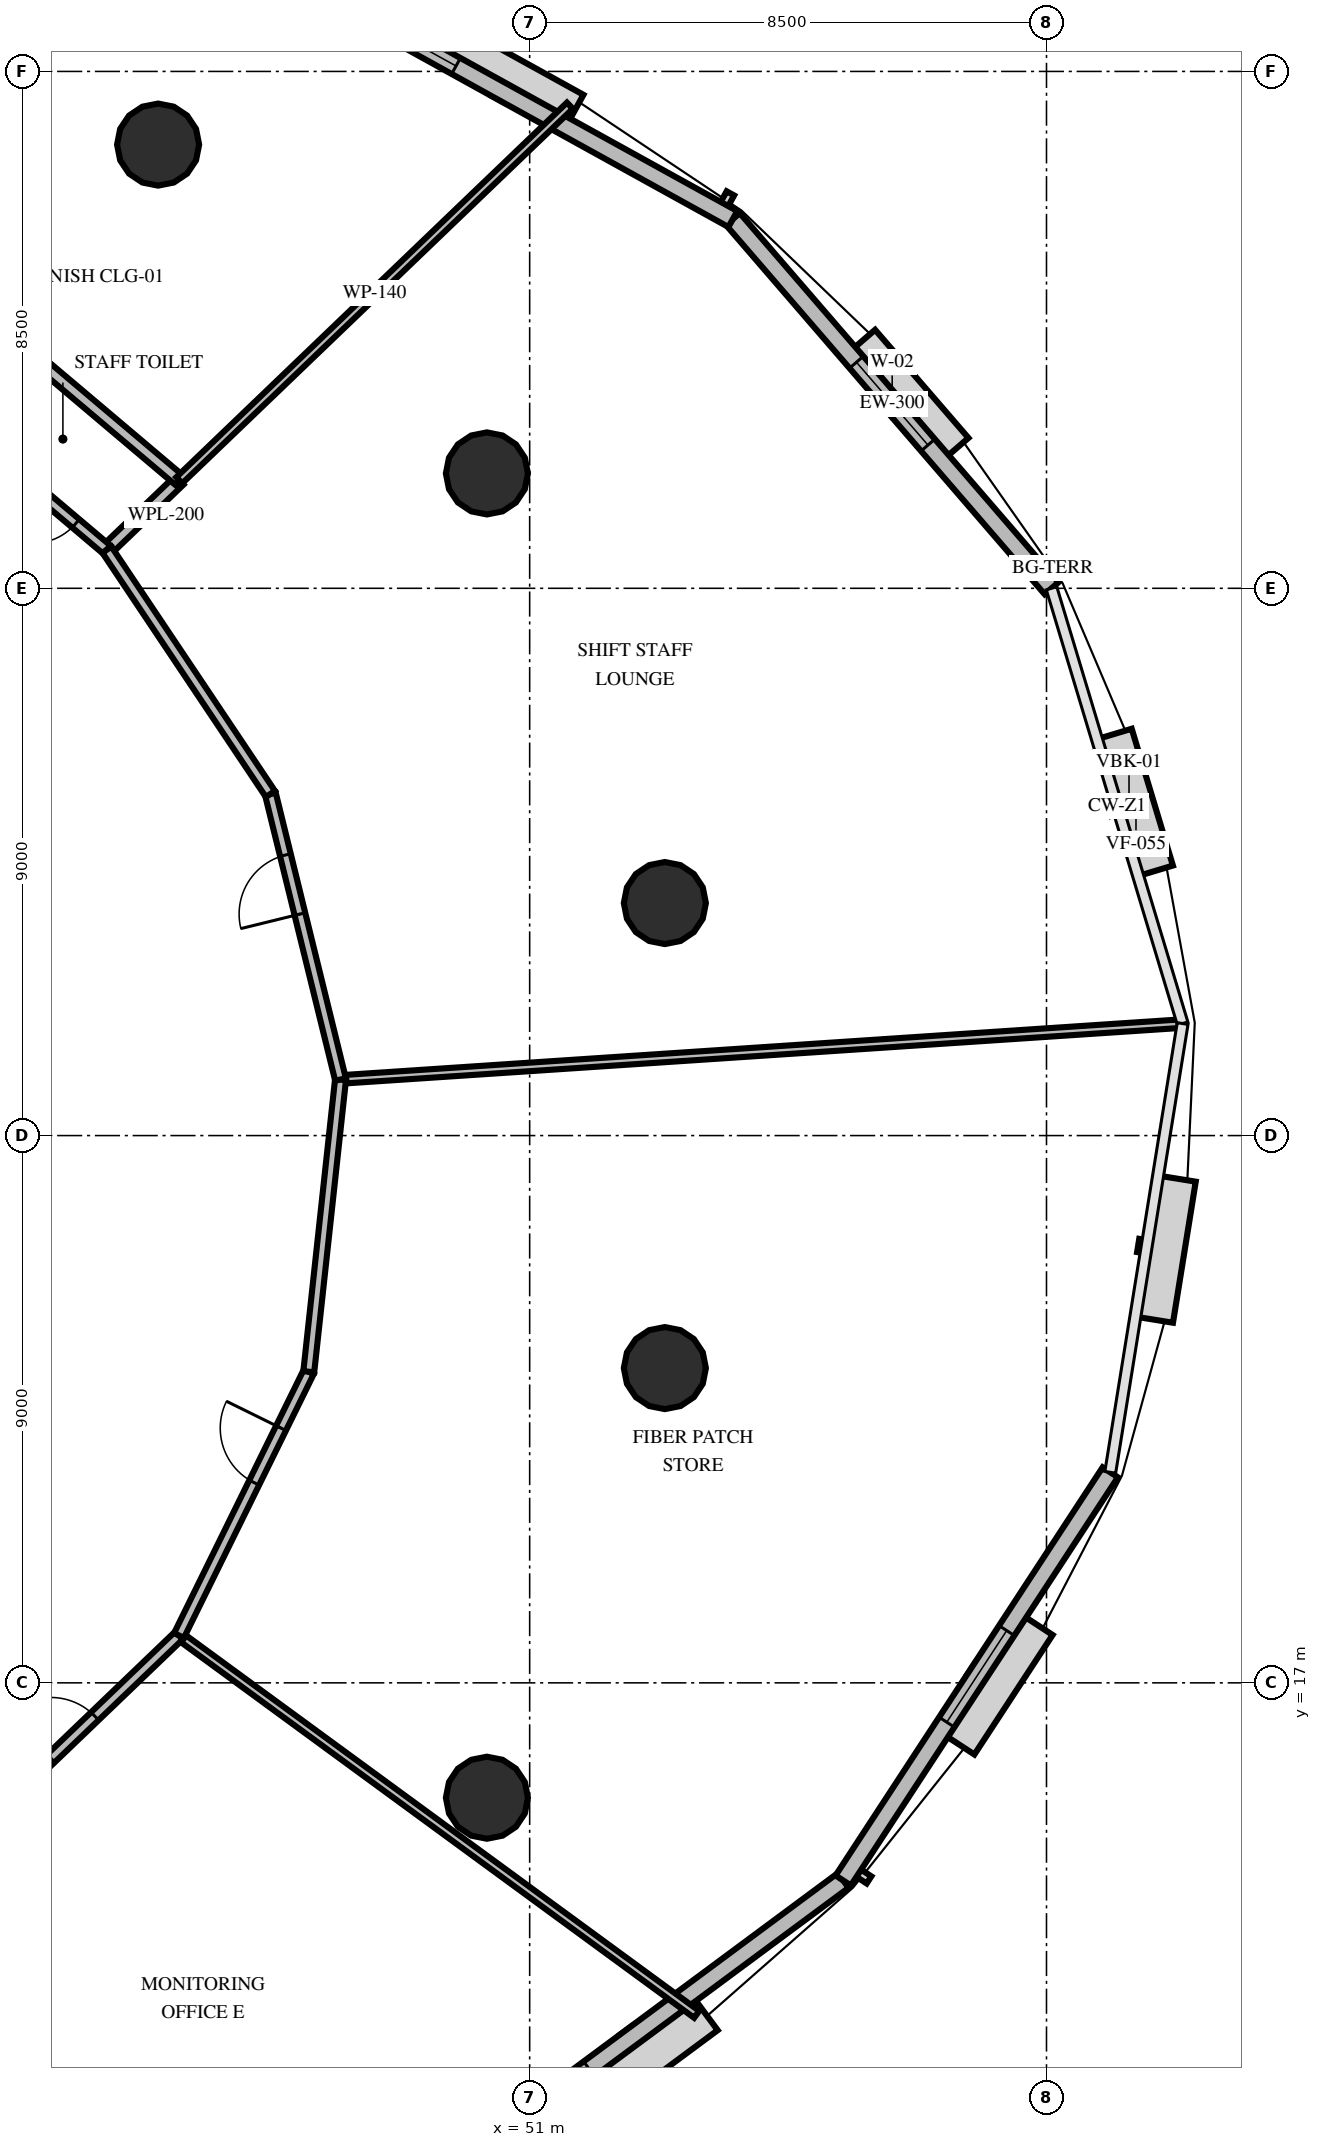
"""IFC4 building model, lengths in metres.
Left out: names, types, materials, properties, quantities, classifications, styles, units other than length and angle.
Written with IfcOpenShell. Run it as: python <this file> out.ifc"""

import sys

from ifc_helpers import new_model, si_unit, direction, frame, frame_2d, origin, origin_2d, place, context, subcontext, project, spatial, rectangle, circle, extrude, element, fill, save


model = new_model("IFC4")
c1 = context("Model", 3, precision=1e-05, world=origin(), true_north=direction((0.0, 1.0)))
c2 = subcontext(c1, "Body", "Model", "MODEL_VIEW")
j1 = project(units=[si_unit("LENGTHUNIT", "METRE"), si_unit("PLANEANGLEUNIT", "RADIAN")], contexts=[c1])
p1 = place(None, origin())
s1 = spatial("IfcSite", under=j1, at=p1, CompositionType="ELEMENT")
p2 = place(p1, origin())
s2 = spatial("IfcBuilding", under=s1, at=p2, CompositionType="ELEMENT")
p3 = place(p2, frame((0.0, 0.0, 46.8)))
s3 = spatial("IfcBuildingStorey", under=s2, at=p3, CompositionType="ELEMENT", Elevation=46.8)
for number, where, z_axis, x_axis in (
    (1, (53.223, 29.824, 0.0), (0.0, 0.0, 1.0), (1.0, 0.0, 0.0)),
    (2, (50.297, 36.889, 0.0), (0.0, 0.0, 1.0), (1.0, 0.0, 0.0)),
    (3, (44.889, 42.297, 0.0), (0.0, 0.0, 1.0), (1.0, 0.0, 0.0)),
    (4, (50.297, 15.111, 0.0), (0.0, 0.0, 1.0), (1.0, 0.0, 0.0)),
    (5, (53.223, 22.176, 0.0), (0.0, 0.0, 1.0), (1.0, 0.0, 0.0)),
):
    element("IfcColumn", number, at=place(p3, frame(where, z_axis=z_axis, x_axis=x_axis)), inside=s3, PredefinedType="COLUMN", context=c2, shape_type="SweptSolid", body=[
        extrude(circle(Radius=0.675, at=origin_2d()), origin(), (0.0, 0.0, 1.0), 4.2),
    ])
p4 = place(p3, frame((59.583, 35.0, 0.0), z_axis=(0.0, 0.0, 1.0), x_axis=(-0.653421746462, 0.756994069495, 0.0)))
e6 = element("IfcWall", 6, at=p4, inside=s3, PredefinedType="SOLIDWALL", context=c2, shape_type="SweptSolid", body=[
    extrude(rectangle(XDim=8.021, YDim=0.3, at=frame_2d((4.011, 0.0))), origin(), (0.0, 0.0, 1.0), 3.0),
])
p5 = place(p4, frame((3.111, 0.0, 0.8)))
e7 = element("IfcOpeningElement", 7, at=p5, cuts=e6, PredefinedType="OPENING", context=c2, shape_type="SweptSolid", body=[
    extrude(rectangle(XDim=1.8, YDim=1.95, at=frame_2d((0.9, 0.975))), frame((0.0, 0.16, 0.0), z_axis=(0.0, -1.0, 0.0), x_axis=(1.0, 0.0, 0.0)), (0.0, 0.0, 1.0), 0.32),
])
p6 = place(p3, frame((54.342, 41.073, 0.0), z_axis=(0.0, 0.0, 1.0), x_axis=(-0.875145624266, 0.48385962461, 0.0)))
e8 = element("IfcWall", 8, at=p6, inside=s3, PredefinedType="SOLIDWALL", context=c2, shape_type="SweptSolid", body=[
    extrude(rectangle(XDim=8.793, YDim=0.3, at=frame_2d((4.396, 0.0))), origin(), (0.0, 0.0, 1.0), 3.0),
])
p7 = place(p6, frame((5.202, 0.0, 0.8)))
e9 = element("IfcOpeningElement", 9, at=p7, cuts=e8, PredefinedType="OPENING", context=c2, shape_type="SweptSolid", body=[
    extrude(rectangle(XDim=1.8, YDim=1.95, at=frame_2d((0.9, 0.975))), frame((0.0, 0.16, 0.0), z_axis=(0.0, -1.0, 0.0), x_axis=(1.0, 0.0, 0.0)), (0.0, 0.0, 1.0), 0.32),
])
p8 = place(p3, frame((49.092, 8.515, 0.0), z_axis=(0.0, 0.0, 1.0), x_axis=(0.803465201032, 0.595351720187, 0.0)))
e10 = element("IfcWall", 10, at=p8, inside=s3, PredefinedType="SOLIDWALL", context=c2, shape_type="SweptSolid", body=[
    extrude(rectangle(XDim=8.792, YDim=0.3, at=frame_2d((4.396, 0.0))), origin(), (0.0, 0.0, 1.0), 3.0),
])
p9 = place(p8, frame((1.79, 0.0, 0.8)))
e11 = element("IfcOpeningElement", 11, at=p9, cuts=e10, PredefinedType="OPENING", context=c2, shape_type="SweptSolid", body=[
    extrude(rectangle(XDim=1.8, YDim=1.95, at=frame_2d((0.9, 0.975))), frame((0.0, 0.16, 0.0), z_axis=(0.0, -1.0, 0.0), x_axis=(1.0, 0.0, 0.0)), (0.0, 0.0, 1.0), 0.32),
])
p10 = place(p3, frame((56.156, 13.75, 0.0), z_axis=(0.0, 0.0, 1.0), x_axis=(0.547551088474, 0.836772254267, 0.0)))
e12 = element("IfcWall", 12, at=p10, inside=s3, PredefinedType="SOLIDWALL", context=c2, shape_type="SweptSolid", body=[
    extrude(rectangle(XDim=8.022, YDim=0.3, at=frame_2d((4.011, 0.0))), origin(), (0.0, 0.0, 1.0), 3.0),
])
p11 = place(p10, frame((3.111, 0.0, 0.8)))
e13 = element("IfcOpeningElement", 13, at=p11, cuts=e12, PredefinedType="OPENING", context=c2, shape_type="SweptSolid", body=[
    extrude(rectangle(XDim=1.8, YDim=1.95, at=frame_2d((0.9, 0.975))), frame((0.0, 0.16, 0.0), z_axis=(0.0, -1.0, 0.0), x_axis=(1.0, 0.0, 0.0)), (0.0, 0.0, 1.0), 0.32),
])
p12 = place(p3, frame((44.047, 35.635, 0.0), z_axis=(0.0, 0.0, 1.0), x_axis=(0.721747944502, 0.692155982858, 0.0)))
e14 = element("IfcWall", 14, at=p12, inside=s3, PredefinedType="PLUMBINGWALL", context=c2, shape_type="SweptSolid", body=[
    extrude(rectangle(XDim=1.65, YDim=0.2, at=frame_2d((0.825, 0.0))), origin(), (0.0, 0.0, 1.0), 3.0),
])
p13 = place(p3, frame((45.238, 36.777, 0.0), z_axis=(0.0, 0.0, 1.0), x_axis=(-0.76377022489, 0.645488221094, 0.0)))
e15 = element("IfcWall", 15, at=p13, inside=s3, PredefinedType="PLUMBINGWALL", context=c2, shape_type="SweptSolid", body=[
    extrude(rectangle(XDim=3.255, YDim=0.2, at=frame_2d((1.627, 0.0))), origin(), (0.0, 0.0, 1.0), 3.0),
])
p14 = place(p3, frame((44.047, 35.635, 0.0), z_axis=(0.0, 0.0, 1.0), x_axis=(-0.763774375934, 0.645483309363, 0.0)))
e16 = element("IfcWall", 16, at=p14, inside=s3, PredefinedType="PARTITIONING", context=c2, shape_type="SweptSolid", body=[
    extrude(rectangle(XDim=2.91, YDim=0.18, at=frame_2d((1.455, 0.0))), origin(), (0.0, 0.0, 1.0), 3.0),
])
p15 = place(p14, frame((0.669, 0.0, 0.0)))
e17 = element("IfcOpeningElement", 17, at=p15, cuts=e16, PredefinedType="OPENING", context=c2, shape_type="SweptSolid", body=[
    extrude(rectangle(XDim=0.92, YDim=2.1, at=frame_2d((0.46, 1.05))), frame((0.0, 0.1, 0.0), z_axis=(0.0, -1.0, 0.0), x_axis=(1.0, 0.0, 0.0)), (0.0, 0.0, 1.0), 0.2),
])
p16 = place(p3, frame((45.238, 36.777, 0.0), z_axis=(0.0, 0.0, 1.0), x_axis=(0.721750646937, 0.692153164874, 0.0)))
e18 = element("IfcWall", 18, at=p16, inside=s3, PredefinedType="PARTITIONING", context=c2, shape_type="SweptSolid", body=[
    extrude(rectangle(XDim=8.9, YDim=0.14, at=frame_2d((4.45, 0.0))), origin(), (0.0, 0.0, 1.0), 3.0),
])
p17 = place(p3, frame((45.233, 17.779, 0.0), z_axis=(0.0, 0.0, 1.0), x_axis=(0.806954200192, -0.590614018453, 0.0)))
e19 = element("IfcWall", 19, at=p17, inside=s3, PredefinedType="PARTITIONING", context=c2, shape_type="SweptSolid", body=[
    extrude(rectangle(XDim=10.55, YDim=0.14, at=frame_2d((5.275, 0.0))), origin(), (0.0, 0.0, 1.0), 3.0),
])
p18 = place(p3, frame((41.744, 14.433, 0.0), z_axis=(0.0, 0.0, 1.0), x_axis=(0.721748503055, 0.692155400425, 0.0)))
e20 = element("IfcWall", 20, at=p18, inside=s3, PredefinedType="PARTITIONING", context=c2, shape_type="SweptSolid", body=[
    extrude(rectangle(XDim=4.834, YDim=0.18, at=frame_2d((2.417, 0.0))), origin(), (0.0, 0.0, 1.0), 3.0),
])
p19 = place(p18, frame((1.917, 0.0, 0.0)))
e21 = element("IfcOpeningElement", 21, at=p19, cuts=e20, PredefinedType="OPENING", context=c2, shape_type="SweptSolid", body=[
    extrude(rectangle(XDim=1.0, YDim=2.15, at=frame_2d((0.5, 1.075))), frame((0.0, 0.1, 0.0), z_axis=(0.0, -1.0, 0.0), x_axis=(1.0, 0.0, 0.0)), (0.0, 0.0, 1.0), 0.2),
])
p20 = place(p3, frame((47.889, 26.923, 0.0), z_axis=(0.0, 0.0, 1.0), x_axis=(0.99780247965, 0.066258671923, 0.0)))
e22 = element("IfcWall", 22, at=p20, inside=s3, PredefinedType="PARTITIONING", context=c2, shape_type="SweptSolid", body=[
    extrude(rectangle(XDim=13.88, YDim=0.14, at=frame_2d((6.94, 0.0))), origin(), (0.0, 0.0, 1.0), 3.0),
])
p21 = place(p3, frame((45.233, 17.779, 0.0), z_axis=(0.0, 0.0, 1.0), x_axis=(0.44148764498, 0.897267328799, 0.0)))
e23 = element("IfcWall", 23, at=p21, inside=s3, PredefinedType="PARTITIONING", context=c2, shape_type="SweptSolid", body=[
    extrude(rectangle(XDim=4.834, YDim=0.18, at=frame_2d((2.417, 0.0))), origin(), (0.0, 0.0, 1.0), 3.0),
])
p22 = place(p21, frame((2.801, 0.0, 0.0)))
e24 = element("IfcOpeningElement", 24, at=p22, cuts=e23, PredefinedType="OPENING", context=c2, shape_type="SweptSolid", body=[
    extrude(rectangle(XDim=1.0, YDim=2.15, at=frame_2d((0.5, 1.075))), frame((0.0, 0.1, 0.0), z_axis=(0.0, -1.0, 0.0), x_axis=(1.0, 0.0, 0.0)), (0.0, 0.0, 1.0), 0.2),
])
p23 = place(p3, frame((47.367, 22.116, 0.0), z_axis=(0.0, 0.0, 1.0), x_axis=(0.108020120209, 0.994148708006, 0.0)))
e25 = element("IfcWall", 25, at=p23, inside=s3, PredefinedType="PARTITIONING", context=c2, shape_type="SweptSolid", body=[
    extrude(rectangle(XDim=4.834, YDim=0.18, at=frame_2d((2.417, 0.0))), origin(), (0.0, 0.0, 1.0), 3.0),
])
p24 = place(p3, frame((47.889, 26.923, 0.0), z_axis=(0.0, 0.0, 1.0), x_axis=(-0.23856484239, 0.971126570523, 0.0)))
e26 = element("IfcWall", 26, at=p24, inside=s3, PredefinedType="PARTITIONING", context=c2, shape_type="SweptSolid", body=[
    extrude(rectangle(XDim=4.834, YDim=0.18, at=frame_2d((2.417, 0.0))), origin(), (0.0, 0.0, 1.0), 3.0),
])
p25 = place(p24, frame((2.801, 0.0, 0.0)))
e27 = element("IfcOpeningElement", 27, at=p25, cuts=e26, PredefinedType="OPENING", context=c2, shape_type="SweptSolid", body=[
    extrude(rectangle(XDim=1.0, YDim=2.15, at=frame_2d((0.5, 1.075))), frame((0.0, 0.1, 0.0), z_axis=(0.0, -1.0, 0.0), x_axis=(1.0, 0.0, 0.0)), (0.0, 0.0, 1.0), 0.2),
])
p26 = place(p3, frame((46.736, 31.617, 0.0), z_axis=(0.0, 0.0, 1.0), x_axis=(-0.556295861918, 0.830984304312, 0.0)))
e28 = element("IfcWall", 28, at=p26, inside=s3, PredefinedType="PARTITIONING", context=c2, shape_type="SweptSolid", body=[
    extrude(rectangle(XDim=4.834, YDim=0.18, at=frame_2d((2.417, 0.0))), origin(), (0.0, 0.0, 1.0), 3.0),
])
p27 = place(p5, origin())
e29 = element("IfcWindow", 29, at=p27, inside=s3, PartitioningType="SINGLE_PANEL", PredefinedType="WINDOW", context=c2, shape_type="SweptSolid", body=[
    extrude(rectangle(XDim=1.8, YDim=1.95, at=frame_2d((0.9, 0.975))), frame((0.0, 0.03, 0.0), z_axis=(0.0, -1.0, 0.0), x_axis=(1.0, 0.0, 0.0)), (0.0, 0.0, 1.0), 0.06),
])
fill(e7, e29)
p28 = place(p7, origin())
e30 = element("IfcWindow", 30, at=p28, inside=s3, PartitioningType="SINGLE_PANEL", PredefinedType="WINDOW", context=c2, shape_type="SweptSolid", body=[
    extrude(rectangle(XDim=1.8, YDim=1.95, at=frame_2d((0.9, 0.975))), frame((0.0, 0.03, 0.0), z_axis=(0.0, -1.0, 0.0), x_axis=(1.0, 0.0, 0.0)), (0.0, 0.0, 1.0), 0.06),
])
fill(e9, e30)
p29 = place(p9, origin())
e31 = element("IfcWindow", 31, at=p29, inside=s3, PartitioningType="SINGLE_PANEL", PredefinedType="WINDOW", context=c2, shape_type="SweptSolid", body=[
    extrude(rectangle(XDim=1.8, YDim=1.95, at=frame_2d((0.9, 0.975))), frame((0.0, 0.03, 0.0), z_axis=(0.0, -1.0, 0.0), x_axis=(1.0, 0.0, 0.0)), (0.0, 0.0, 1.0), 0.06),
])
fill(e11, e31)
p30 = place(p11, origin())
e32 = element("IfcWindow", 32, at=p30, inside=s3, PartitioningType="SINGLE_PANEL", PredefinedType="WINDOW", context=c2, shape_type="SweptSolid", body=[
    extrude(rectangle(XDim=1.8, YDim=1.95, at=frame_2d((0.9, 0.975))), frame((0.0, 0.03, 0.0), z_axis=(0.0, -1.0, 0.0), x_axis=(1.0, 0.0, 0.0)), (0.0, 0.0, 1.0), 0.06),
])
fill(e13, e32)
p31 = place(p15, origin())
e33 = element("IfcDoor", 33, at=p31, inside=s3, OperationType="SINGLE_SWING_RIGHT", PredefinedType="DOOR", context=c2, shape_type="SweptSolid", body=[
    extrude(rectangle(XDim=0.92, YDim=2.1, at=frame_2d((0.46, 1.05))), frame((0.0, 0.025, 0.0), z_axis=(0.0, -1.0, 0.0), x_axis=(1.0, 0.0, 0.0)), (0.0, 0.0, 1.0), 0.05),
])
fill(e17, e33)
p32 = place(p19, origin())
e34 = element("IfcDoor", 34, at=p32, inside=s3, OperationType="SINGLE_SWING_LEFT", PredefinedType="DOOR", context=c2, shape_type="SweptSolid", body=[
    extrude(rectangle(XDim=1.0, YDim=2.15, at=frame_2d((0.5, 1.075))), frame((0.0, 0.025, 0.0), z_axis=(0.0, -1.0, 0.0), x_axis=(1.0, 0.0, 0.0)), (0.0, 0.0, 1.0), 0.05),
])
fill(e21, e34)
p33 = place(p22, origin())
e35 = element("IfcDoor", 35, at=p33, inside=s3, OperationType="SINGLE_SWING_RIGHT", PredefinedType="DOOR", context=c2, shape_type="SweptSolid", body=[
    extrude(rectangle(XDim=1.0, YDim=2.15, at=frame_2d((0.5, 1.075))), frame((0.0, 0.025, 0.0), z_axis=(0.0, -1.0, 0.0), x_axis=(1.0, 0.0, 0.0)), (0.0, 0.0, 1.0), 0.05),
])
fill(e24, e35)
p34 = place(p25, origin())
e36 = element("IfcDoor", 36, at=p34, inside=s3, OperationType="SINGLE_SWING_LEFT", PredefinedType="DOOR", context=c2, shape_type="SweptSolid", body=[
    extrude(rectangle(XDim=1.0, YDim=2.15, at=frame_2d((0.5, 1.075))), frame((0.0, 0.025, 0.0), z_axis=(0.0, -1.0, 0.0), x_axis=(1.0, 0.0, 0.0)), (0.0, 0.0, 1.0), 0.05),
])
fill(e27, e36)
save(model, sys.argv[1])
